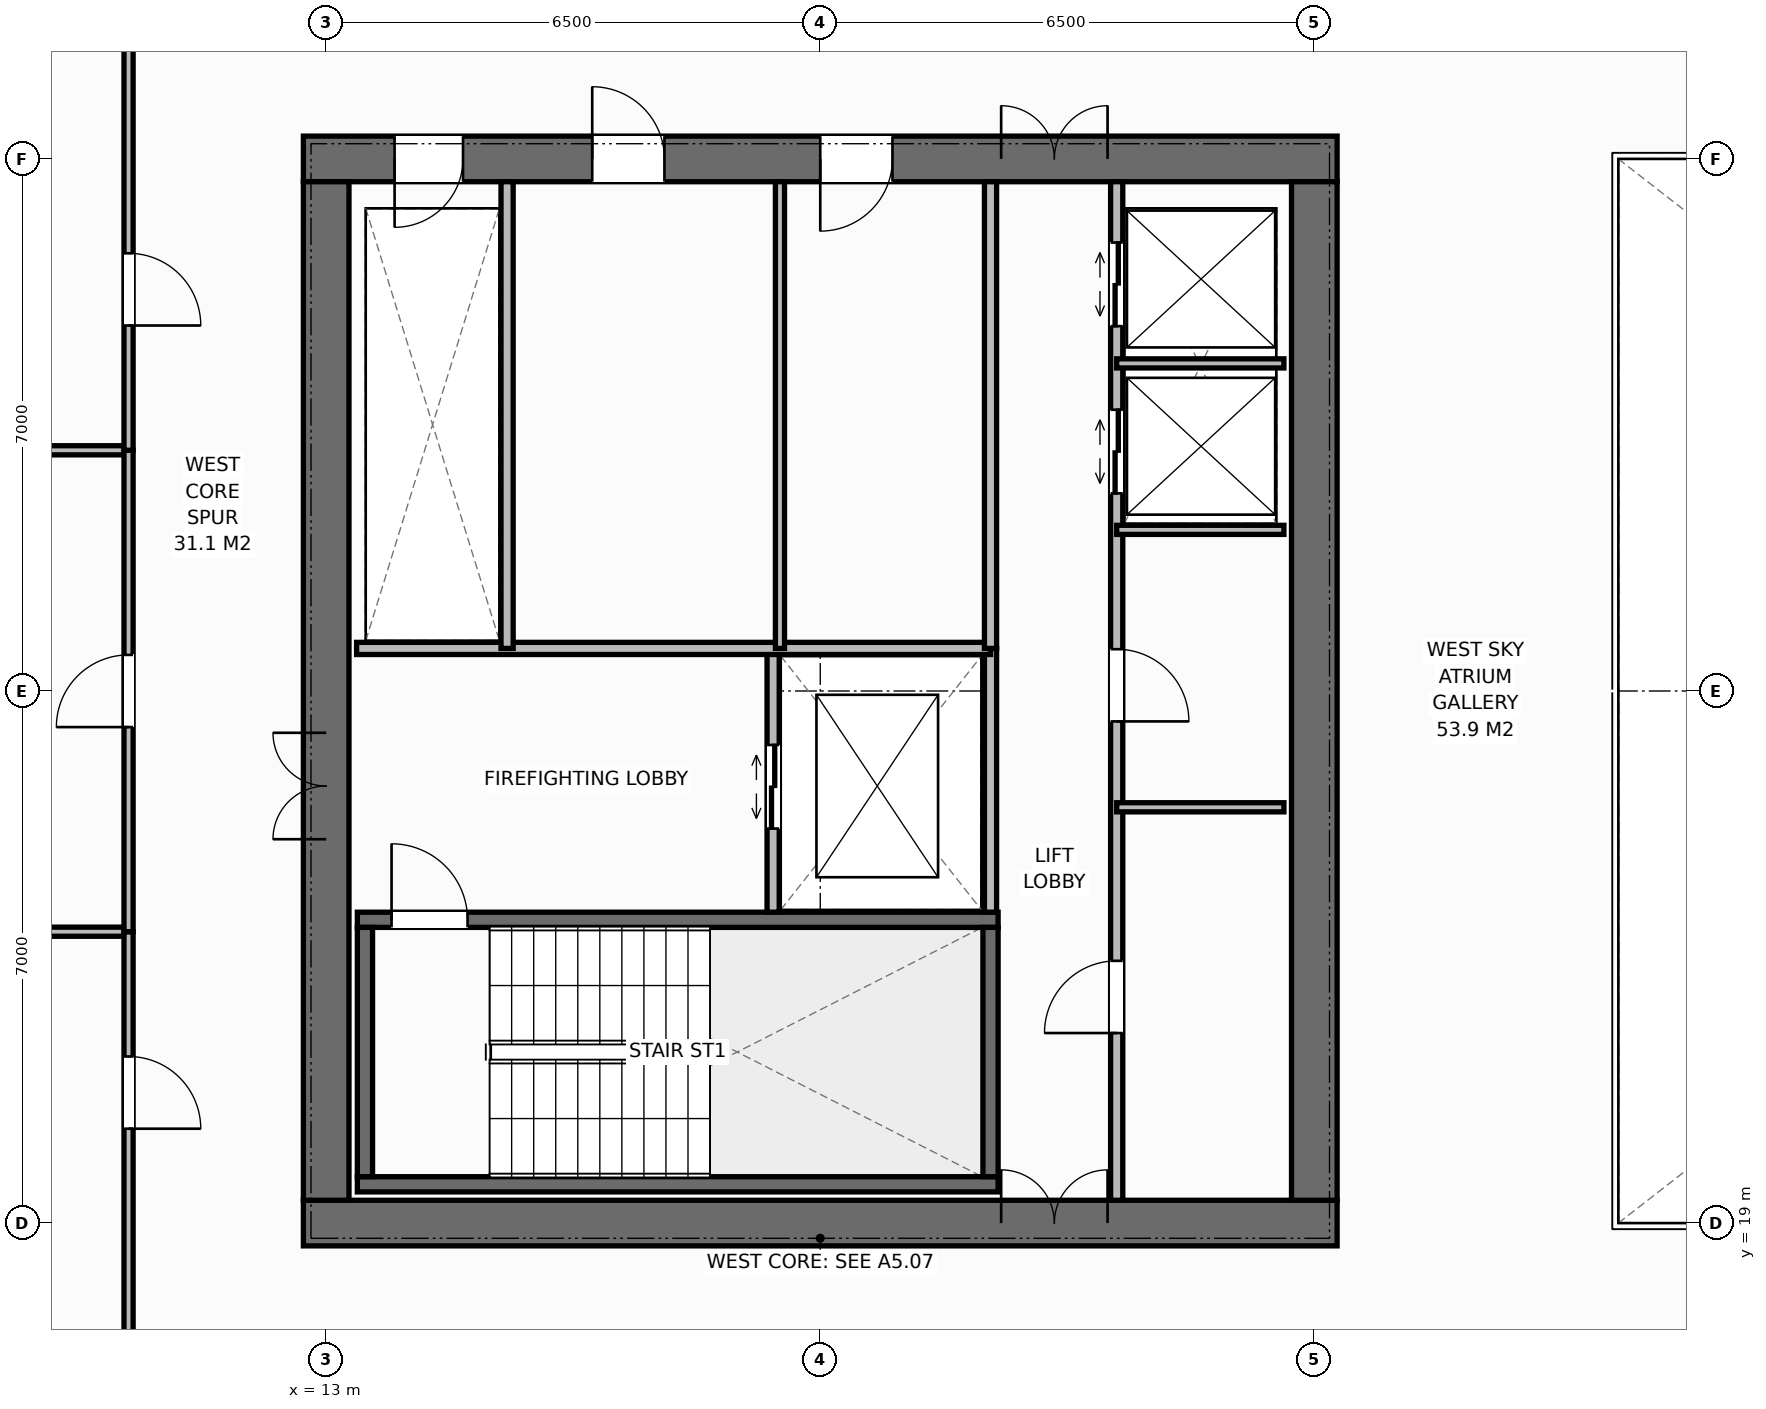
"""IFC4 building model, lengths in metres.
Left out: names, types, materials, properties, quantities, classifications, styles, units other than length and angle.
Written with IfcOpenShell. Run it as: python <this file> out.ifc"""

import sys

from ifc_helpers import new_model, si_unit, direction, frame, frame_2d, origin, place, context, subcontext, project, spatial, rectangle, extrude, element, fill, save


model = new_model("IFC4")
c1 = context("Model", 3, precision=1e-05, world=origin(), true_north=direction((0.0, 1.0)))
c2 = subcontext(c1, "Body", "Model", "MODEL_VIEW")
j1 = project(units=[si_unit("LENGTHUNIT", "METRE"), si_unit("PLANEANGLEUNIT", "RADIAN")], contexts=[c1])
p1 = place(None, origin())
s1 = spatial("IfcSite", under=j1, at=p1, CompositionType="ELEMENT")
p2 = place(p1, origin())
s2 = spatial("IfcBuilding", under=s1, at=p2, CompositionType="ELEMENT")
p3 = place(p2, frame((0.0, 0.0, 186.0)))
s3 = spatial("IfcBuildingStorey", under=s2, at=p3, CompositionType="ELEMENT", Elevation=186.0)
p4 = place(p3, frame((12.7, 19.0, 0.0), z_axis=(0.0, 0.0, 1.0), x_axis=(1.0, 0.0, 0.0)))
e1 = element("IfcWall", 1, at=p4, inside=s3, PredefinedType="SHEAR", context=c2, shape_type="SweptSolid", body=[
    extrude(rectangle(XDim=13.6, YDim=0.6, at=frame_2d((6.8, 0.0))), origin(), (0.0, 0.0, 1.0), 3.8),
])
p5 = place(p4, frame((9.18, 0.0, 0.0)))
e2 = element("IfcOpeningElement", 2, at=p5, cuts=e1, PredefinedType="OPENING", context=c2, shape_type="SweptSolid", body=[
    extrude(rectangle(XDim=1.4, YDim=2.2, at=frame_2d((0.7, 1.1))), frame((0.0, 0.31, 0.0), z_axis=(0.0, -1.0, 0.0), x_axis=(1.0, 0.0, 0.0)), (0.0, 0.0, 1.0), 0.62),
])
p6 = place(p3, frame((12.7, 33.0, 0.0), z_axis=(0.0, 0.0, 1.0), x_axis=(1.0, 0.0, 0.0)))
e3 = element("IfcWall", 3, at=p6, inside=s3, PredefinedType="SHEAR", context=c2, shape_type="SweptSolid", body=[
    extrude(rectangle(XDim=13.6, YDim=0.6, at=frame_2d((6.8, 0.0))), origin(), (0.0, 0.0, 1.0), 3.8),
])
p7 = place(p6, frame((1.2, 0.0, 0.0)))
e4 = element("IfcOpeningElement", 4, at=p7, cuts=e3, PredefinedType="OPENING", context=c2, shape_type="SweptSolid", body=[
    extrude(rectangle(XDim=0.9, YDim=2.15, at=frame_2d((0.45, 1.075))), frame((0.0, 0.31, 0.0), z_axis=(0.0, -1.0, 0.0), x_axis=(1.0, 0.0, 0.0)), (0.0, 0.0, 1.0), 0.62),
])
p8 = place(p6, frame((3.8, 0.0, 0.0)))
e5 = element("IfcOpeningElement", 5, at=p8, cuts=e3, PredefinedType="OPENING", context=c2, shape_type="SweptSolid", body=[
    extrude(rectangle(XDim=0.95, YDim=2.15, at=frame_2d((0.475, 1.075))), frame((0.0, 0.31, 0.0), z_axis=(0.0, -1.0, 0.0), x_axis=(1.0, 0.0, 0.0)), (0.0, 0.0, 1.0), 0.62),
])
p9 = place(p6, frame((6.8, 0.0, 0.0)))
e6 = element("IfcOpeningElement", 6, at=p9, cuts=e3, PredefinedType="OPENING", context=c2, shape_type="SweptSolid", body=[
    extrude(rectangle(XDim=0.95, YDim=2.15, at=frame_2d((0.475, 1.075))), frame((0.0, 0.31, 0.0), z_axis=(0.0, -1.0, 0.0), x_axis=(1.0, 0.0, 0.0)), (0.0, 0.0, 1.0), 0.62),
])
p10 = place(p6, frame((9.18, 0.0, 0.0)))
e7 = element("IfcOpeningElement", 7, at=p10, cuts=e3, PredefinedType="OPENING", context=c2, shape_type="SweptSolid", body=[
    extrude(rectangle(XDim=1.4, YDim=2.2, at=frame_2d((0.7, 1.1))), frame((0.0, 0.31, 0.0), z_axis=(0.0, -1.0, 0.0), x_axis=(1.0, 0.0, 0.0)), (0.0, 0.0, 1.0), 0.62),
])
p11 = place(p3, frame((13.0, 19.3, 0.0), z_axis=(0.0, 0.0, 1.0), x_axis=(0.0, 1.0, 0.0)))
e8 = element("IfcWall", 8, at=p11, inside=s3, PredefinedType="SHEAR", context=c2, shape_type="SweptSolid", body=[
    extrude(rectangle(XDim=13.4, YDim=0.6, at=frame_2d((6.7, 0.0))), origin(), (0.0, 0.0, 1.0), 3.8),
])
p12 = place(p11, frame((4.75, 0.0, 0.0)))
e9 = element("IfcOpeningElement", 9, at=p12, cuts=e8, PredefinedType="OPENING", context=c2, shape_type="SweptSolid", body=[
    extrude(rectangle(XDim=1.4, YDim=2.2, at=frame_2d((0.7, 1.1))), frame((0.0, 0.31, 0.0), z_axis=(0.0, -1.0, 0.0), x_axis=(1.0, 0.0, 0.0)), (0.0, 0.0, 1.0), 0.62),
])
p13 = place(p3, frame((26.0, 19.3, 0.0), z_axis=(0.0, 0.0, 1.0), x_axis=(0.0, 1.0, 0.0)))
e10 = element("IfcWall", 10, at=p13, inside=s3, PredefinedType="SHEAR", context=c2, shape_type="SweptSolid", body=[
    extrude(rectangle(XDim=13.4, YDim=0.6, at=frame_2d((6.7, 0.0))), origin(), (0.0, 0.0, 1.0), 3.8),
])
p14 = place(p3, frame((13.41, 19.51, 0.0), z_axis=(0.0, 0.0, 1.0), x_axis=(1.0, 0.0, 0.0)))
e11 = element("IfcWall", 11, at=p14, inside=s3, PredefinedType="SHEAR", context=c2, shape_type="SweptSolid", body=[
    extrude(rectangle(XDim=8.43, YDim=0.2, at=frame_2d((4.215, 0.0))), origin(), (0.0, 0.0, 1.0), 3.8),
])
p15 = place(p3, frame((13.41, 22.99, 0.0), z_axis=(0.0, 0.0, 1.0), x_axis=(1.0, 0.0, 0.0)))
e12 = element("IfcWall", 12, at=p15, inside=s3, PredefinedType="SHEAR", context=c2, shape_type="SweptSolid", body=[
    extrude(rectangle(XDim=8.43, YDim=0.2, at=frame_2d((4.215, 0.0))), origin(), (0.0, 0.0, 1.0), 3.8),
])
p16 = place(p15, frame((0.45, 0.0, 0.0)))
e13 = element("IfcOpeningElement", 13, at=p16, cuts=e12, PredefinedType="OPENING", context=c2, shape_type="SweptSolid", body=[
    extrude(rectangle(XDim=1.0, YDim=2.15, at=frame_2d((0.5, 1.075))), frame((0.0, 0.11, 0.0), z_axis=(0.0, -1.0, 0.0), x_axis=(1.0, 0.0, 0.0)), (0.0, 0.0, 1.0), 0.22),
])
for number, where, z_axis, x_axis in (
    (14, (13.51, 19.61, 0.0), (0.0, 0.0, 1.0), (0.0, 1.0, 0.0)),
    (15, (21.74, 19.61, 0.0), (0.0, 0.0, 1.0), (0.0, 1.0, 0.0)),
):
    element("IfcWall", number, at=place(p3, frame(where, z_axis=z_axis, x_axis=x_axis)), inside=s3, PredefinedType="SHEAR", context=c2, shape_type="SweptSolid", body=[
        extrude(rectangle(XDim=3.28, YDim=0.2, at=frame_2d((1.64, 0.0))), origin(), (0.0, 0.0, 1.0), 3.8),
    ])
p17 = place(p3, frame((21.74, 23.09, 0.0), z_axis=(0.0, 0.0, 1.0), x_axis=(0.0, 1.0, 0.0)))
e16 = element("IfcWall", 16, at=p17, inside=s3, PredefinedType="STANDARD", context=c2, shape_type="SweptSolid", body=[
    extrude(rectangle(XDim=3.47, YDim=0.16, at=frame_2d((1.735, 0.0))), origin(), (0.0, 0.0, 1.0), 3.572),
])
p18 = place(p3, frame((18.88, 23.09, 0.0), z_axis=(0.0, 0.0, 1.0), x_axis=(0.0, 1.0, 0.0)))
e17 = element("IfcWall", 17, at=p18, inside=s3, PredefinedType="STANDARD", context=c2, shape_type="SweptSolid", body=[
    extrude(rectangle(XDim=3.47, YDim=0.16, at=frame_2d((1.735, 0.0))), origin(), (0.0, 0.0, 1.0), 3.572),
])
p19 = place(p18, frame((1.1, 0.0, 0.0)))
e18 = element("IfcOpeningElement", 18, at=p19, cuts=e17, PredefinedType="OPENING", context=c2, shape_type="SweptSolid", body=[
    extrude(rectangle(XDim=1.1, YDim=2.2, at=frame_2d((0.55, 1.1))), frame((0.0, 0.09, 0.0), z_axis=(0.0, -1.0, 0.0), x_axis=(1.0, 0.0, 0.0)), (0.0, 0.0, 1.0), 0.18),
])
p20 = place(p3, frame((13.4, 26.56, 0.0), z_axis=(0.0, 0.0, 1.0), x_axis=(1.0, 0.0, 0.0)))
e19 = element("IfcWall", 19, at=p20, inside=s3, PredefinedType="STANDARD", context=c2, shape_type="SweptSolid", body=[
    extrude(rectangle(XDim=8.34, YDim=0.16, at=frame_2d((4.17, 0.0))), origin(), (0.0, 0.0, 1.0), 3.572),
])
p21 = place(p3, frame((15.38, 26.56, 0.0), z_axis=(0.0, 0.0, 1.0), x_axis=(0.0, 1.0, 0.0)))
e20 = element("IfcWall", 20, at=p21, inside=s3, PredefinedType="STANDARD", context=c2, shape_type="SweptSolid", body=[
    extrude(rectangle(XDim=6.14, YDim=0.16, at=frame_2d((3.07, 0.0))), origin(), (0.0, 0.0, 1.0), 3.572),
])
p22 = place(p3, frame((18.97, 26.56, 0.0), z_axis=(0.0, 0.0, 1.0), x_axis=(0.0, 1.0, 0.0)))
e21 = element("IfcWall", 21, at=p22, inside=s3, PredefinedType="PARTITIONING", context=c2, shape_type="SweptSolid", body=[
    extrude(rectangle(XDim=6.14, YDim=0.12, at=frame_2d((3.07, 0.0))), origin(), (0.0, 0.0, 1.0), 3.572),
])
p23 = place(p3, frame((21.74, 26.56, 0.0), z_axis=(0.0, 0.0, 1.0), x_axis=(0.0, 1.0, 0.0)))
e22 = element("IfcWall", 22, at=p23, inside=s3, PredefinedType="STANDARD", context=c2, shape_type="SweptSolid", body=[
    extrude(rectangle(XDim=6.14, YDim=0.16, at=frame_2d((3.07, 0.0))), origin(), (0.0, 0.0, 1.0), 3.572),
])
p24 = place(p3, frame((23.4, 19.3, 0.0), z_axis=(0.0, 0.0, 1.0), x_axis=(0.0, 1.0, 0.0)))
e23 = element("IfcWall", 23, at=p24, inside=s3, PredefinedType="STANDARD", context=c2, shape_type="SweptSolid", body=[
    extrude(rectangle(XDim=13.4, YDim=0.16, at=frame_2d((6.7, 0.0))), origin(), (0.0, 0.0, 1.0), 3.572),
])
p25 = place(p24, frame((2.2, 0.0, 0.0)))
e24 = element("IfcOpeningElement", 24, at=p25, cuts=e23, PredefinedType="OPENING", context=c2, shape_type="SweptSolid", body=[
    extrude(rectangle(XDim=0.95, YDim=2.15, at=frame_2d((0.475, 1.075))), frame((0.0, 0.09, 0.0), z_axis=(0.0, -1.0, 0.0), x_axis=(1.0, 0.0, 0.0)), (0.0, 0.0, 1.0), 0.18),
])
p26 = place(p24, frame((6.3, 0.0, 0.0)))
e25 = element("IfcOpeningElement", 25, at=p26, cuts=e23, PredefinedType="OPENING", context=c2, shape_type="SweptSolid", body=[
    extrude(rectangle(XDim=0.95, YDim=2.15, at=frame_2d((0.475, 1.075))), frame((0.0, 0.09, 0.0), z_axis=(0.0, -1.0, 0.0), x_axis=(1.0, 0.0, 0.0)), (0.0, 0.0, 1.0), 0.18),
])
p27 = place(p24, frame((9.3, 0.0, 0.0)))
e26 = element("IfcOpeningElement", 26, at=p27, cuts=e23, PredefinedType="OPENING", context=c2, shape_type="SweptSolid", body=[
    extrude(rectangle(XDim=1.1, YDim=2.2, at=frame_2d((0.55, 1.1))), frame((0.0, 0.09, 0.0), z_axis=(0.0, -1.0, 0.0), x_axis=(1.0, 0.0, 0.0)), (0.0, 0.0, 1.0), 0.18),
])
p28 = place(p24, frame((11.5, 0.0, 0.0)))
e27 = element("IfcOpeningElement", 27, at=p28, cuts=e23, PredefinedType="OPENING", context=c2, shape_type="SweptSolid", body=[
    extrude(rectangle(XDim=1.1, YDim=2.2, at=frame_2d((0.55, 1.1))), frame((0.0, 0.09, 0.0), z_axis=(0.0, -1.0, 0.0), x_axis=(1.0, 0.0, 0.0)), (0.0, 0.0, 1.0), 0.18),
])
for number, where, z_axis, x_axis in (
    (28, (23.4, 24.47, 0.0), (0.0, 0.0, 1.0), (1.0, 0.0, 0.0)),
    (29, (23.4, 28.12, 0.0), (0.0, 0.0, 1.0), (1.0, 0.0, 0.0)),
    (30, (23.4, 30.31, 0.0), (0.0, 0.0, 1.0), (1.0, 0.0, 0.0)),
):
    element("IfcWall", number, at=place(p3, frame(where, z_axis=z_axis, x_axis=x_axis)), inside=s3, PredefinedType="PARTITIONING", context=c2, shape_type="SweptSolid", body=[
        extrude(rectangle(XDim=2.2, YDim=0.12, at=frame_2d((1.1, 0.0))), origin(), (0.0, 0.0, 1.0), 3.572),
    ])
p29 = place(p3, frame((3.82, 22.833, 0.0), z_axis=(0.0, 0.0, 1.0), x_axis=(1.0, 0.0, 0.0)))
e31 = element("IfcWall", 31, at=p29, inside=s3, PredefinedType="PARTITIONING", context=c2, shape_type="SweptSolid", body=[
    extrude(rectangle(XDim=6.58, YDim=0.12, at=frame_2d((3.29, 0.0))), origin(), (0.0, 0.0, 1.0), 3.572),
])
p30 = place(p3, frame((10.4, 16.5, 0.0), z_axis=(0.0, 0.0, 1.0), x_axis=(0.0, 1.0, 0.0)))
e32 = element("IfcWall", 32, at=p30, inside=s3, PredefinedType="PARTITIONING", context=c2, shape_type="SweptSolid", body=[
    extrude(rectangle(XDim=6.333, YDim=0.12, at=frame_2d((3.167, 0.0))), origin(), (0.0, 0.0, 1.0), 3.572),
])
p31 = place(p30, frame((3.742, 0.0, 0.0)))
e33 = element("IfcOpeningElement", 33, at=p31, cuts=e32, PredefinedType="OPENING", context=c2, shape_type="SweptSolid", body=[
    extrude(rectangle(XDim=0.95, YDim=2.15, at=frame_2d((0.475, 1.075))), frame((0.0, 0.07, 0.0), z_axis=(0.0, -1.0, 0.0), x_axis=(1.0, 0.0, 0.0)), (0.0, 0.0, 1.0), 0.14),
])
p32 = place(p3, frame((3.82, 29.167, 0.0), z_axis=(0.0, 0.0, 1.0), x_axis=(1.0, 0.0, 0.0)))
e34 = element("IfcWall", 34, at=p32, inside=s3, PredefinedType="PARTITIONING", context=c2, shape_type="SweptSolid", body=[
    extrude(rectangle(XDim=6.58, YDim=0.12, at=frame_2d((3.29, 0.0))), origin(), (0.0, 0.0, 1.0), 3.572),
])
p33 = place(p3, frame((10.4, 22.833, 0.0), z_axis=(0.0, 0.0, 1.0), x_axis=(0.0, 1.0, 0.0)))
e35 = element("IfcWall", 35, at=p33, inside=s3, PredefinedType="PARTITIONING", context=c2, shape_type="SweptSolid", body=[
    extrude(rectangle(XDim=6.333, YDim=0.12, at=frame_2d((3.167, 0.0))), origin(), (0.0, 0.0, 1.0), 3.572),
])
p34 = place(p33, frame((2.692, 0.0, 0.0)))
e36 = element("IfcOpeningElement", 36, at=p34, cuts=e35, PredefinedType="OPENING", context=c2, shape_type="SweptSolid", body=[
    extrude(rectangle(XDim=0.95, YDim=2.15, at=frame_2d((0.475, 1.075))), frame((0.0, 0.07, 0.0), z_axis=(0.0, -1.0, 0.0), x_axis=(1.0, 0.0, 0.0)), (0.0, 0.0, 1.0), 0.14),
])
p35 = place(p3, frame((10.4, 29.167, 0.0), z_axis=(0.0, 0.0, 1.0), x_axis=(0.0, 1.0, 0.0)))
e37 = element("IfcWall", 37, at=p35, inside=s3, PredefinedType="PARTITIONING", context=c2, shape_type="SweptSolid", body=[
    extrude(rectangle(XDim=6.333, YDim=0.12, at=frame_2d((3.167, 0.0))), origin(), (0.0, 0.0, 1.0), 3.572),
])
p36 = place(p35, frame((1.642, 0.0, 0.0)))
e38 = element("IfcOpeningElement", 38, at=p36, cuts=e37, PredefinedType="OPENING", context=c2, shape_type="SweptSolid", body=[
    extrude(rectangle(XDim=0.95, YDim=2.15, at=frame_2d((0.475, 1.075))), frame((0.0, 0.07, 0.0), z_axis=(0.0, -1.0, 0.0), x_axis=(1.0, 0.0, 0.0)), (0.0, 0.0, 1.0), 0.14),
])
p37 = place(p16, origin())
e39 = element("IfcDoor", 39, at=p37, inside=s3, OperationType="SINGLE_SWING_LEFT", PredefinedType="DOOR", context=c2, shape_type="SweptSolid", body=[
    extrude(rectangle(XDim=1.0, YDim=2.15, at=frame_2d((0.5, 1.075))), frame((0.0, 0.025, 0.0), z_axis=(0.0, -1.0, 0.0), x_axis=(1.0, 0.0, 0.0)), (0.0, 0.0, 1.0), 0.05),
])
fill(e13, e39)
p38 = place(p12, origin())
e40 = element("IfcDoor", 40, at=p38, inside=s3, OperationType="DOUBLE_DOOR_SINGLE_SWING", PredefinedType="DOOR", context=c2, shape_type="SweptSolid", body=[
    extrude(rectangle(XDim=1.4, YDim=2.2, at=frame_2d((0.7, 1.1))), frame((0.0, 0.025, 0.0), z_axis=(0.0, -1.0, 0.0), x_axis=(1.0, 0.0, 0.0)), (0.0, 0.0, 1.0), 0.05),
])
fill(e9, e40)
p39 = place(p19, origin())
e41 = element("IfcDoor", 41, at=p39, inside=s3, OperationType="DOUBLE_DOOR_SLIDING", PredefinedType="DOOR", context=c2, shape_type="SweptSolid", body=[
    extrude(rectangle(XDim=1.1, YDim=2.2, at=frame_2d((0.55, 1.1))), frame((0.0, 0.025, 0.0), z_axis=(0.0, -1.0, 0.0), x_axis=(1.0, 0.0, 0.0)), (0.0, 0.0, 1.0), 0.05),
])
fill(e18, e41)
p40 = place(p7, origin())
e42 = element("IfcDoor", 42, at=p40, inside=s3, OperationType="SINGLE_SWING_RIGHT", PredefinedType="DOOR", context=c2, shape_type="SweptSolid", body=[
    extrude(rectangle(XDim=0.9, YDim=2.15, at=frame_2d((0.45, 1.075))), frame((0.0, -0.025, 0.0), z_axis=(0.0, -1.0, 0.0), x_axis=(1.0, 0.0, 0.0)), (0.0, 0.0, 1.0), 0.05),
])
fill(e4, e42)
p41 = place(p8, origin())
e43 = element("IfcDoor", 43, at=p41, inside=s3, OperationType="SINGLE_SWING_LEFT", PredefinedType="DOOR", context=c2, shape_type="SweptSolid", body=[
    extrude(rectangle(XDim=0.95, YDim=2.15, at=frame_2d((0.475, 1.075))), frame((0.0, -0.025, 0.0), z_axis=(0.0, -1.0, 0.0), x_axis=(1.0, 0.0, 0.0)), (0.0, 0.0, 1.0), 0.05),
])
fill(e5, e43)
p42 = place(p9, origin())
e44 = element("IfcDoor", 44, at=p42, inside=s3, OperationType="SINGLE_SWING_RIGHT", PredefinedType="DOOR", context=c2, shape_type="SweptSolid", body=[
    extrude(rectangle(XDim=0.95, YDim=2.15, at=frame_2d((0.475, 1.075))), frame((0.0, -0.025, 0.0), z_axis=(0.0, -1.0, 0.0), x_axis=(1.0, 0.0, 0.0)), (0.0, 0.0, 1.0), 0.05),
])
fill(e6, e44)
p43 = place(p5, origin())
e45 = element("IfcDoor", 45, at=p43, inside=s3, OperationType="DOUBLE_DOOR_SINGLE_SWING", PredefinedType="DOOR", context=c2, shape_type="SweptSolid", body=[
    extrude(rectangle(XDim=1.4, YDim=2.2, at=frame_2d((0.7, 1.1))), frame((0.0, 0.075, 0.0), z_axis=(0.0, -1.0, 0.0), x_axis=(1.0, 0.0, 0.0)), (0.0, 0.0, 1.0), 0.05),
])
fill(e2, e45)
p44 = place(p10, origin())
e46 = element("IfcDoor", 46, at=p44, inside=s3, OperationType="DOUBLE_DOOR_SINGLE_SWING", PredefinedType="DOOR", context=c2, shape_type="SweptSolid", body=[
    extrude(rectangle(XDim=1.4, YDim=2.2, at=frame_2d((0.7, 1.1))), frame((0.0, -0.025, 0.0), z_axis=(0.0, -1.0, 0.0), x_axis=(1.0, 0.0, 0.0)), (0.0, 0.0, 1.0), 0.05),
])
fill(e7, e46)
p45 = place(p25, origin())
e47 = element("IfcDoor", 47, at=p45, inside=s3, OperationType="SINGLE_SWING_LEFT", PredefinedType="DOOR", context=c2, shape_type="SweptSolid", body=[
    extrude(rectangle(XDim=0.95, YDim=2.15, at=frame_2d((0.475, 1.075))), frame((0.0, 0.025, 0.0), z_axis=(0.0, -1.0, 0.0), x_axis=(1.0, 0.0, 0.0)), (0.0, 0.0, 1.0), 0.05),
])
fill(e24, e47)
p46 = place(p26, origin())
e48 = element("IfcDoor", 48, at=p46, inside=s3, OperationType="SINGLE_SWING_RIGHT", PredefinedType="DOOR", context=c2, shape_type="SweptSolid", body=[
    extrude(rectangle(XDim=0.95, YDim=2.15, at=frame_2d((0.475, 1.075))), frame((0.0, 0.025, 0.0), z_axis=(0.0, -1.0, 0.0), x_axis=(1.0, 0.0, 0.0)), (0.0, 0.0, 1.0), 0.05),
])
fill(e25, e48)
p47 = place(p27, origin())
e49 = element("IfcDoor", 49, at=p47, inside=s3, OperationType="DOUBLE_DOOR_SLIDING", PredefinedType="DOOR", context=c2, shape_type="SweptSolid", body=[
    extrude(rectangle(XDim=1.1, YDim=2.2, at=frame_2d((0.55, 1.1))), frame((0.0, 0.025, 0.0), z_axis=(0.0, -1.0, 0.0), x_axis=(1.0, 0.0, 0.0)), (0.0, 0.0, 1.0), 0.05),
])
fill(e26, e49)
p48 = place(p28, origin())
e50 = element("IfcDoor", 50, at=p48, inside=s3, OperationType="DOUBLE_DOOR_SLIDING", PredefinedType="DOOR", context=c2, shape_type="SweptSolid", body=[
    extrude(rectangle(XDim=1.1, YDim=2.2, at=frame_2d((0.55, 1.1))), frame((0.0, 0.025, 0.0), z_axis=(0.0, -1.0, 0.0), x_axis=(1.0, 0.0, 0.0)), (0.0, 0.0, 1.0), 0.05),
])
fill(e27, e50)
p49 = place(p31, origin())
e51 = element("IfcDoor", 51, at=p49, inside=s3, OperationType="SINGLE_SWING_RIGHT", PredefinedType="DOOR", context=c2, shape_type="SweptSolid", body=[
    extrude(rectangle(XDim=0.95, YDim=2.15, at=frame_2d((0.475, 1.075))), frame((0.0, 0.025, 0.0), z_axis=(0.0, -1.0, 0.0), x_axis=(1.0, 0.0, 0.0)), (0.0, 0.0, 1.0), 0.05),
])
fill(e33, e51)
p50 = place(p34, origin())
e52 = element("IfcDoor", 52, at=p50, inside=s3, OperationType="SINGLE_SWING_LEFT", PredefinedType="DOOR", context=c2, shape_type="SweptSolid", body=[
    extrude(rectangle(XDim=0.95, YDim=2.15, at=frame_2d((0.475, 1.075))), frame((0.0, 0.025, 0.0), z_axis=(0.0, -1.0, 0.0), x_axis=(1.0, 0.0, 0.0)), (0.0, 0.0, 1.0), 0.05),
])
fill(e36, e52)
p51 = place(p36, origin())
e53 = element("IfcDoor", 53, at=p51, inside=s3, OperationType="SINGLE_SWING_RIGHT", PredefinedType="DOOR", context=c2, shape_type="SweptSolid", body=[
    extrude(rectangle(XDim=0.95, YDim=2.15, at=frame_2d((0.475, 1.075))), frame((0.0, 0.025, 0.0), z_axis=(0.0, -1.0, 0.0), x_axis=(1.0, 0.0, 0.0)), (0.0, 0.0, 1.0), 0.05),
])
fill(e38, e53)
save(model, sys.argv[1])
